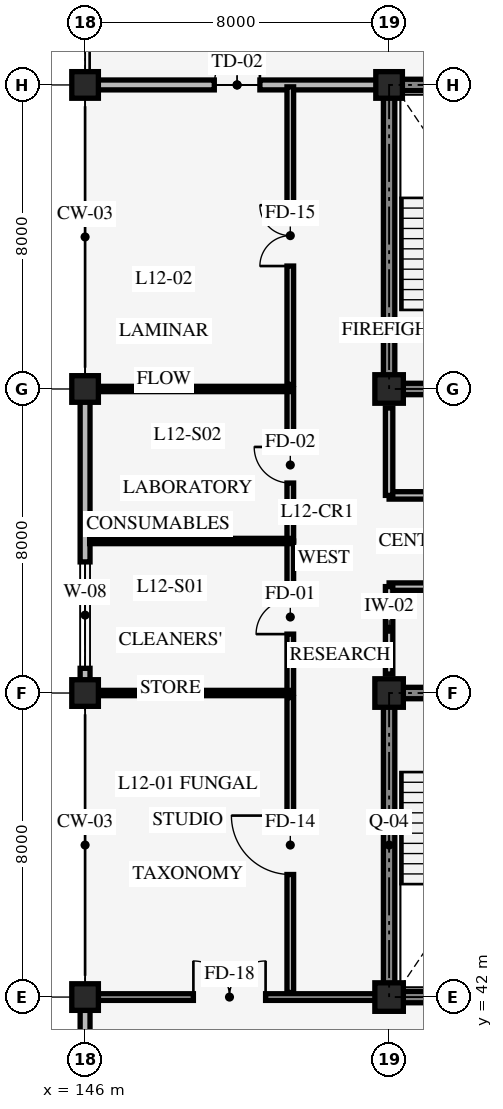
"""IFC4 building model, lengths in metres.
Left out: names, types, materials, properties, quantities, classifications, styles, units other than length and angle.
Written with IfcOpenShell. Run it as: python <this file> out.ifc"""

import sys

from ifc_helpers import new_model, si_unit, direction, frame, frame_2d, origin, origin_2d, place, context, subcontext, project, spatial, rectangle, extrude, element, fill, save


model = new_model("IFC4")
c1 = context("Model", 3, precision=1e-05, world=origin(), true_north=direction((0.0, 1.0)))
c2 = subcontext(c1, "Body", "Model", "MODEL_VIEW")
j1 = project(units=[si_unit("LENGTHUNIT", "METRE"), si_unit("PLANEANGLEUNIT", "RADIAN")], contexts=[c1])
p1 = place(None, origin())
s1 = spatial("IfcSite", under=j1, at=p1, CompositionType="ELEMENT")
p2 = place(p1, origin())
s2 = spatial("IfcBuilding", under=s1, at=p2, CompositionType="ELEMENT")
p3 = place(p2, frame((0.0, 0.0, 48.6)))
s3 = spatial("IfcBuildingStorey", under=s2, at=p3, CompositionType="ELEMENT", Elevation=48.6)
p4 = place(p3, frame((154.0, 42.0, 0.0), z_axis=(0.0, 0.0, 1.0), x_axis=(1.0, 0.0, 0.0)))
e1 = element("IfcWall", 1, at=p4, inside=s3, PredefinedType="SHEAR", context=c2, shape_type="SweptSolid", body=[
    extrude(rectangle(XDim=8.0, YDim=0.3, at=frame_2d((4.0, 0.0))), origin(), (0.0, 0.0, 1.0), 3.95),
])
p5 = place(p3, frame((162.0, 50.0, 0.0), z_axis=(0.0, 0.0, 1.0), x_axis=(-1.0, 0.0, 0.0)))
e2 = element("IfcWall", 2, at=p5, inside=s3, PredefinedType="SHEAR", context=c2, shape_type="SweptSolid", body=[
    extrude(rectangle(XDim=8.0, YDim=0.3, at=frame_2d((4.0, 0.0))), origin(), (0.0, 0.0, 1.0), 3.95),
])
p6 = place(p5, frame((5.3, 0.0, 0.0)))
e3 = element("IfcOpeningElement", 3, at=p6, cuts=e2, PredefinedType="OPENING", context=c2, shape_type="SweptSolid", body=[
    extrude(rectangle(XDim=1.3, YDim=2.15, at=frame_2d((0.65, 1.075))), frame((0.0, 0.16, 0.0), z_axis=(0.0, -1.0, 0.0), x_axis=(1.0, 0.0, 0.0)), (0.0, 0.0, 1.0), 0.32),
])
p7 = place(p5, frame((1.45, 0.0, 0.0)))
e4 = element("IfcOpeningElement", 4, at=p7, cuts=e2, PredefinedType="OPENING", context=c2, shape_type="SweptSolid", body=[
    extrude(rectangle(XDim=1.1, YDim=2.2, at=frame_2d((0.55, 1.1))), frame((0.0, 0.16, 0.0), z_axis=(0.0, -1.0, 0.0), x_axis=(1.0, 0.0, 0.0)), (0.0, 0.0, 1.0), 0.32),
])
p8 = place(p3, frame((154.0, 50.0, 0.0), z_axis=(0.0, 0.0, 1.0), x_axis=(0.0, -1.0, 0.0)))
e5 = element("IfcWall", 5, at=p8, inside=s3, PredefinedType="SHEAR", context=c2, shape_type="SweptSolid", body=[
    extrude(rectangle(XDim=8.0, YDim=0.3, at=frame_2d((4.0, 0.0))), origin(), (0.0, 0.0, 1.0), 3.95),
])
p9 = place(p3, frame((154.0, 58.0, 0.0), z_axis=(0.0, 0.0, 1.0), x_axis=(1.0, 0.0, 0.0)))
e6 = element("IfcWall", 6, at=p9, inside=s3, PredefinedType="SHEAR", context=c2, shape_type="SweptSolid", body=[
    extrude(rectangle(XDim=8.0, YDim=0.3, at=frame_2d((4.0, 0.0))), origin(), (0.0, 0.0, 1.0), 3.95),
])
p10 = place(p9, frame((1.4, 0.0, 0.0)))
e7 = element("IfcOpeningElement", 7, at=p10, cuts=e6, PredefinedType="OPENING", context=c2, shape_type="SweptSolid", body=[
    extrude(rectangle(XDim=1.3, YDim=2.15, at=frame_2d((0.65, 1.075))), frame((0.0, 0.16, 0.0), z_axis=(0.0, -1.0, 0.0), x_axis=(1.0, 0.0, 0.0)), (0.0, 0.0, 1.0), 0.32),
])
p11 = place(p9, frame((5.3, 0.0, 0.0)))
e8 = element("IfcOpeningElement", 8, at=p11, cuts=e6, PredefinedType="OPENING", context=c2, shape_type="SweptSolid", body=[
    extrude(rectangle(XDim=1.1, YDim=2.2, at=frame_2d((0.55, 1.1))), frame((0.0, 0.16, 0.0), z_axis=(0.0, -1.0, 0.0), x_axis=(1.0, 0.0, 0.0)), (0.0, 0.0, 1.0), 0.32),
])
for number, where, z_axis, x_axis in (
    (9, (162.0, 66.0, 0.0), (0.0, 0.0, 1.0), (-1.0, 0.0, 0.0)),
    (10, (154.0, 66.0, 0.0), (0.0, 0.0, 1.0), (0.0, -1.0, 0.0)),
):
    element("IfcWall", number, at=place(p3, frame(where, z_axis=z_axis, x_axis=x_axis)), inside=s3, PredefinedType="SHEAR", context=c2, shape_type="SweptSolid", body=[
        extrude(rectangle(XDim=8.0, YDim=0.3, at=frame_2d((4.0, 0.0))), origin(), (0.0, 0.0, 1.0), 3.95),
    ])
for number, where, z_axis, x_axis in (
    (11, (146.0, 42.0, 0.0), (0.0, 0.0, 1.0), (1.0, 0.0, 0.0)),
    (12, (146.0, 50.0, 0.0), (0.0, 0.0, 1.0), (1.0, 0.0, 0.0)),
    (13, (146.0, 58.0, 0.0), (0.0, 0.0, 1.0), (1.0, 0.0, 0.0)),
    (14, (146.0, 66.0, 0.0), (0.0, 0.0, 1.0), (1.0, 0.0, 0.0)),
):
    element("IfcColumn", number, at=place(p3, frame(where, z_axis=z_axis, x_axis=x_axis)), inside=s3, PredefinedType="COLUMN", context=c2, shape_type="SweptSolid", body=[
        extrude(rectangle(XDim=0.7, YDim=0.7, at=origin_2d()), origin(), (0.0, 0.0, 1.0), 4.2),
    ])
for number, where, z_axis, x_axis in (
    (15, (154.0, 42.0, 0.0), (0.0, 0.0, 1.0), (1.0, 0.0, 0.0)),
    (16, (154.0, 50.0, 0.0), (0.0, 0.0, 1.0), (1.0, 0.0, 0.0)),
    (17, (154.0, 58.0, 0.0), (0.0, 0.0, 1.0), (1.0, 0.0, 0.0)),
):
    element("IfcColumn", number, at=place(p3, frame(where, z_axis=z_axis, x_axis=x_axis)), inside=s3, PredefinedType="COLUMN", context=c2, shape_type="SweptSolid", body=[
        extrude(rectangle(XDim=0.75, YDim=0.75, at=origin_2d()), origin(), (0.0, 0.0, 1.0), 4.2),
    ])
p12 = place(p3, frame((154.0, 66.0, 0.0), z_axis=(0.0, 0.0, 1.0), x_axis=(1.0, 0.0, 0.0)))
e18 = element("IfcColumn", 18, at=p12, inside=s3, PredefinedType="COLUMN", context=c2, shape_type="SweptSolid", body=[
    extrude(rectangle(XDim=0.7, YDim=0.7, at=origin_2d()), origin(), (0.0, 0.0, 1.0), 4.2),
])
p13 = place(p3, frame((146.0, 34.0, 0.0), z_axis=(0.0, 0.0, 1.0), x_axis=(0.0, 1.0, 0.0)))
e19 = element("IfcWall", 19, at=p13, inside=s3, PredefinedType="STANDARD", context=c2, shape_type="SweptSolid", body=[
    extrude(rectangle(XDim=8.0, YDim=0.26, at=frame_2d((4.0, 0.0))), origin(), (0.0, 0.0, 1.0), 3.24),
])
p14 = place(p13, frame((2.5, 0.0, 0.85)))
e20 = element("IfcOpeningElement", 20, at=p14, cuts=e19, PredefinedType="OPENING", context=c2, shape_type="SweptSolid", body=[
    extrude(rectangle(XDim=3.0, YDim=1.8, at=frame_2d((1.5, 0.9))), frame((0.0, 0.14, 0.0), z_axis=(0.0, -1.0, 0.0), x_axis=(1.0, 0.0, 0.0)), (0.0, 0.0, 1.0), 0.28),
])
p15 = place(p3, frame((146.0, 50.0, 0.0), z_axis=(0.0, 0.0, 1.0), x_axis=(0.0, 1.0, 0.0)))
e21 = element("IfcWall", 21, at=p15, inside=s3, PredefinedType="STANDARD", context=c2, shape_type="SweptSolid", body=[
    extrude(rectangle(XDim=8.0, YDim=0.26, at=frame_2d((4.0, 0.0))), origin(), (0.0, 0.0, 1.0), 3.24),
])
p16 = place(p15, frame((0.65, 0.0, 0.85)))
e22 = element("IfcOpeningElement", 22, at=p16, cuts=e21, PredefinedType="OPENING", context=c2, shape_type="SweptSolid", body=[
    extrude(rectangle(XDim=2.8, YDim=1.6, at=frame_2d((1.4, 0.8))), frame((0.0, 0.14, 0.0), z_axis=(0.0, -1.0, 0.0), x_axis=(1.0, 0.0, 0.0)), (0.0, 0.0, 1.0), 0.28),
])
p17 = place(p3, frame((146.0, 66.0, 0.0), z_axis=(0.0, 0.0, 1.0), x_axis=(1.0, 0.0, 0.0)))
e23 = element("IfcWall", 23, at=p17, inside=s3, PredefinedType="STANDARD", context=c2, shape_type="SweptSolid", body=[
    extrude(rectangle(XDim=8.0, YDim=0.26, at=frame_2d((4.0, 0.0))), origin(), (0.0, 0.0, 1.0), 3.34),
])
p18 = place(p17, frame((3.4, 0.0, 0.0)))
e24 = element("IfcOpeningElement", 24, at=p18, cuts=e23, PredefinedType="OPENING", context=c2, shape_type="SweptSolid", body=[
    extrude(rectangle(XDim=1.2, YDim=2.2, at=frame_2d((0.6, 1.1))), frame((0.0, 0.14, 0.0), z_axis=(0.0, -1.0, 0.0), x_axis=(1.0, 0.0, 0.0)), (0.0, 0.0, 1.0), 0.28),
])
p19 = place(p3, frame((154.0, 52.8, 0.0), z_axis=(0.0, 0.0, 1.0), x_axis=(1.0, 0.0, 0.0)))
e25 = element("IfcWall", 25, at=p19, inside=s3, PredefinedType="STANDARD", context=c2, shape_type="SweptSolid", body=[
    extrude(rectangle(XDim=7.6, YDim=0.195, at=frame_2d((3.8, 0.0))), origin(), (0.0, 0.0, 1.0), 3.9),
])
p20 = place(p19, frame((2.8, 0.0, 0.0)))
e26 = element("IfcOpeningElement", 26, at=p20, cuts=e25, PredefinedType="OPENING", context=c2, shape_type="SweptSolid", body=[
    extrude(rectangle(XDim=1.2, YDim=2.1, at=frame_2d((0.6, 1.05))), frame((0.0, 0.107, 0.0), z_axis=(0.0, -1.0, 0.0), x_axis=(1.0, 0.0, 0.0)), (0.0, 0.0, 1.0), 0.215),
])
p21 = place(p3, frame((154.0, 50.5, 0.0), z_axis=(0.0, 0.0, 1.0), x_axis=(0.0, 1.0, 0.0)))
e27 = element("IfcWall", 27, at=p21, inside=s3, PredefinedType="STANDARD", context=c2, shape_type="SweptSolid", body=[
    extrude(rectangle(XDim=2.3, YDim=0.195, at=frame_2d((1.15, 0.0))), origin(), (0.0, 0.0, 1.0), 3.24),
])
p22 = place(p3, frame((154.0, 55.2, 0.0), z_axis=(0.0, 0.0, 1.0), x_axis=(1.0, 0.0, 0.0)))
e28 = element("IfcWall", 28, at=p22, inside=s3, PredefinedType="STANDARD", context=c2, shape_type="SweptSolid", body=[
    extrude(rectangle(XDim=7.6, YDim=0.195, at=frame_2d((3.8, 0.0))), origin(), (0.0, 0.0, 1.0), 3.9),
])
p23 = place(p22, frame((2.8, 0.0, 0.0)))
e29 = element("IfcOpeningElement", 29, at=p23, cuts=e28, PredefinedType="OPENING", context=c2, shape_type="SweptSolid", body=[
    extrude(rectangle(XDim=1.3, YDim=2.15, at=frame_2d((0.65, 1.075))), frame((0.0, 0.107, 0.0), z_axis=(0.0, -1.0, 0.0), x_axis=(1.0, 0.0, 0.0)), (0.0, 0.0, 1.0), 0.215),
])
p24 = place(p3, frame((154.0, 55.2, 0.0), z_axis=(0.0, 0.0, 1.0), x_axis=(0.0, 1.0, 0.0)))
e30 = element("IfcWall", 30, at=p24, inside=s3, PredefinedType="STANDARD", context=c2, shape_type="SweptSolid", body=[
    extrude(rectangle(XDim=2.3, YDim=0.195, at=frame_2d((1.15, 0.0))), origin(), (0.0, 0.0, 1.0), 3.24),
])
p25 = place(p3, frame((151.4, 42.12, 0.0), z_axis=(0.0, 0.0, 1.0), x_axis=(0.0, 1.0, 0.0)))
e31 = element("IfcWall", 31, at=p25, inside=s3, PredefinedType="STANDARD", context=c2, shape_type="SweptSolid", body=[
    extrude(rectangle(XDim=7.76, YDim=0.175, at=frame_2d((3.88, 0.0))), origin(), (0.0, 0.0, 1.0), 3.9),
])
p26 = place(p25, frame((3.105, 0.0, 0.0)))
e32 = element("IfcOpeningElement", 32, at=p26, cuts=e31, PredefinedType="OPENING", context=c2, shape_type="SweptSolid", body=[
    extrude(rectangle(XDim=1.55, YDim=2.25, at=frame_2d((0.775, 1.125))), frame((0.0, 0.098, 0.0), z_axis=(0.0, -1.0, 0.0), x_axis=(1.0, 0.0, 0.0)), (0.0, 0.0, 1.0), 0.195),
])
p27 = place(p3, frame((151.4, 58.12, 0.0), z_axis=(0.0, 0.0, 1.0), x_axis=(0.0, 1.0, 0.0)))
e33 = element("IfcWall", 33, at=p27, inside=s3, PredefinedType="STANDARD", context=c2, shape_type="SweptSolid", body=[
    extrude(rectangle(XDim=7.83, YDim=0.175, at=frame_2d((3.915, 0.0))), origin(), (0.0, 0.0, 1.0), 3.9),
])
p28 = place(p27, frame((3.115, 0.0, 0.0)))
e34 = element("IfcOpeningElement", 34, at=p28, cuts=e33, PredefinedType="OPENING", context=c2, shape_type="SweptSolid", body=[
    extrude(rectangle(XDim=1.6, YDim=2.25, at=frame_2d((0.8, 1.125))), frame((0.0, 0.098, 0.0), z_axis=(0.0, -1.0, 0.0), x_axis=(1.0, 0.0, 0.0)), (0.0, 0.0, 1.0), 0.195),
])
p29 = place(p3, frame((151.4, 50.0, 0.0), z_axis=(0.0, 0.0, 1.0), x_axis=(0.0, 1.0, 0.0)))
e35 = element("IfcWall", 35, at=p29, inside=s3, PredefinedType="STANDARD", context=c2, shape_type="SweptSolid", body=[
    extrude(rectangle(XDim=4.0, YDim=0.175, at=frame_2d((2.0, 0.0))), origin(), (0.0, 0.0, 1.0), 3.9),
])
p30 = place(p29, frame((1.55, 0.0, 0.0)))
e36 = element("IfcOpeningElement", 36, at=p30, cuts=e35, PredefinedType="OPENING", context=c2, shape_type="SweptSolid", body=[
    extrude(rectangle(XDim=0.9, YDim=2.1, at=frame_2d((0.45, 1.05))), frame((0.0, 0.098, 0.0), z_axis=(0.0, -1.0, 0.0), x_axis=(1.0, 0.0, 0.0)), (0.0, 0.0, 1.0), 0.195),
])
p31 = place(p3, frame((151.4, 54.0, 0.0), z_axis=(0.0, 0.0, 1.0), x_axis=(0.0, 1.0, 0.0)))
e37 = element("IfcWall", 37, at=p31, inside=s3, PredefinedType="STANDARD", context=c2, shape_type="SweptSolid", body=[
    extrude(rectangle(XDim=4.0, YDim=0.175, at=frame_2d((2.0, 0.0))), origin(), (0.0, 0.0, 1.0), 3.9),
])
p32 = place(p31, frame((1.525, 0.0, 0.0)))
e38 = element("IfcOpeningElement", 38, at=p32, cuts=e37, PredefinedType="OPENING", context=c2, shape_type="SweptSolid", body=[
    extrude(rectangle(XDim=0.95, YDim=2.1, at=frame_2d((0.475, 1.05))), frame((0.0, 0.098, 0.0), z_axis=(0.0, -1.0, 0.0), x_axis=(1.0, 0.0, 0.0)), (0.0, 0.0, 1.0), 0.195),
])
p33 = place(p3, frame((146.12, 50.0, 0.0), z_axis=(0.0, 0.0, 1.0), x_axis=(1.0, 0.0, 0.0)))
e39 = element("IfcWall", 39, at=p33, inside=s3, PredefinedType="STANDARD", context=c2, shape_type="SweptSolid", body=[
    extrude(rectangle(XDim=5.28, YDim=0.14, at=frame_2d((2.64, 0.0))), origin(), (0.0, 0.0, 1.0), 3.19),
])
p34 = place(p3, frame((146.12, 54.0, 0.0), z_axis=(0.0, 0.0, 1.0), x_axis=(1.0, 0.0, 0.0)))
e40 = element("IfcWall", 40, at=p34, inside=s3, PredefinedType="STANDARD", context=c2, shape_type="SweptSolid", body=[
    extrude(rectangle(XDim=5.28, YDim=0.14, at=frame_2d((2.64, 0.0))), origin(), (0.0, 0.0, 1.0), 3.9),
])
p35 = place(p3, frame((146.12, 58.0, 0.0), z_axis=(0.0, 0.0, 1.0), x_axis=(1.0, 0.0, 0.0)))
e41 = element("IfcWall", 41, at=p35, inside=s3, PredefinedType="STANDARD", context=c2, shape_type="SweptSolid", body=[
    extrude(rectangle(XDim=5.28, YDim=0.14, at=frame_2d((2.64, 0.0))), origin(), (0.0, 0.0, 1.0), 3.19),
])
p36 = place(p3, frame((146.35, 42.0, 0.0), z_axis=(0.0, 0.0, 1.0), x_axis=(1.0, 0.0, 0.0)))
e42 = element("IfcWall", 42, at=p36, inside=s3, PredefinedType="STANDARD", context=c2, shape_type="SweptSolid", body=[
    extrude(rectangle(XDim=7.3, YDim=0.175, at=frame_2d((3.65, 0.0))), origin(), (0.0, 0.0, 1.0), 3.19),
])
p37 = place(p36, frame((2.5, 0.0, 0.0)))
e43 = element("IfcOpeningElement", 43, at=p37, cuts=e42, PredefinedType="OPENING", context=c2, shape_type="SweptSolid", body=[
    extrude(rectangle(XDim=1.9, YDim=2.35, at=frame_2d((0.95, 1.175))), frame((0.0, 0.098, 0.0), z_axis=(0.0, -1.0, 0.0), x_axis=(1.0, 0.0, 0.0)), (0.0, 0.0, 1.0), 0.195),
])
p38 = place(p16, origin())
e44 = element("IfcWindow", 44, at=p38, inside=s3, PartitioningType="SINGLE_PANEL", PredefinedType="WINDOW", context=c2, shape_type="SweptSolid", body=[
    extrude(rectangle(XDim=2.8, YDim=1.6, at=frame_2d((1.4, 0.8))), frame((0.0, 0.03, 0.0), z_axis=(0.0, -1.0, 0.0), x_axis=(1.0, 0.0, 0.0)), (0.0, 0.0, 1.0), 0.06),
])
fill(e22, e44)
p39 = place(p18, origin())
e45 = element("IfcDoor", 45, at=p39, inside=s3, OperationType="SINGLE_SWING_RIGHT", PredefinedType="DOOR", context=c2, shape_type="SweptSolid", body=[
    extrude(rectangle(XDim=1.2, YDim=2.2, at=frame_2d((0.6, 1.1))), frame((0.0, 0.025, 0.0), z_axis=(0.0, -1.0, 0.0), x_axis=(1.0, 0.0, 0.0)), (0.0, 0.0, 1.0), 0.05),
])
fill(e24, e45)
p40 = place(p26, origin())
e46 = element("IfcDoor", 46, at=p40, inside=s3, OperationType="SINGLE_SWING_RIGHT", PredefinedType="DOOR", context=c2, shape_type="SweptSolid", body=[
    extrude(rectangle(XDim=1.55, YDim=2.25, at=frame_2d((0.775, 1.125))), frame((0.0, 0.025, 0.0), z_axis=(0.0, -1.0, 0.0), x_axis=(1.0, 0.0, 0.0)), (0.0, 0.0, 1.0), 0.05),
])
fill(e32, e46)
p41 = place(p28, origin())
e47 = element("IfcDoor", 47, at=p41, inside=s3, OperationType="DOUBLE_DOOR_SINGLE_SWING", PredefinedType="DOOR", context=c2, shape_type="SweptSolid", body=[
    extrude(rectangle(XDim=1.6, YDim=2.25, at=frame_2d((0.8, 1.125))), frame((0.0, 0.025, 0.0), z_axis=(0.0, -1.0, 0.0), x_axis=(1.0, 0.0, 0.0)), (0.0, 0.0, 1.0), 0.05),
])
fill(e34, e47)
p42 = place(p30, origin())
e48 = element("IfcDoor", 48, at=p42, inside=s3, OperationType="SINGLE_SWING_LEFT", PredefinedType="DOOR", context=c2, shape_type="SweptSolid", body=[
    extrude(rectangle(XDim=0.9, YDim=2.1, at=frame_2d((0.45, 1.05))), frame((0.0, 0.025, 0.0), z_axis=(0.0, -1.0, 0.0), x_axis=(1.0, 0.0, 0.0)), (0.0, 0.0, 1.0), 0.05),
])
fill(e36, e48)
p43 = place(p32, origin())
e49 = element("IfcDoor", 49, at=p43, inside=s3, OperationType="SINGLE_SWING_RIGHT", PredefinedType="DOOR", context=c2, shape_type="SweptSolid", body=[
    extrude(rectangle(XDim=0.95, YDim=2.1, at=frame_2d((0.475, 1.05))), frame((0.0, 0.025, 0.0), z_axis=(0.0, -1.0, 0.0), x_axis=(1.0, 0.0, 0.0)), (0.0, 0.0, 1.0), 0.05),
])
fill(e38, e49)
p44 = place(p37, origin())
e50 = element("IfcDoor", 50, at=p44, inside=s3, OperationType="DOUBLE_DOOR_SINGLE_SWING", PredefinedType="DOOR", context=c2, shape_type="SweptSolid", body=[
    extrude(rectangle(XDim=1.9, YDim=2.35, at=frame_2d((0.95, 1.175))), frame((0.0, 0.025, 0.0), z_axis=(0.0, -1.0, 0.0), x_axis=(1.0, 0.0, 0.0)), (0.0, 0.0, 1.0), 0.05),
])
fill(e43, e50)
save(model, sys.argv[1])
